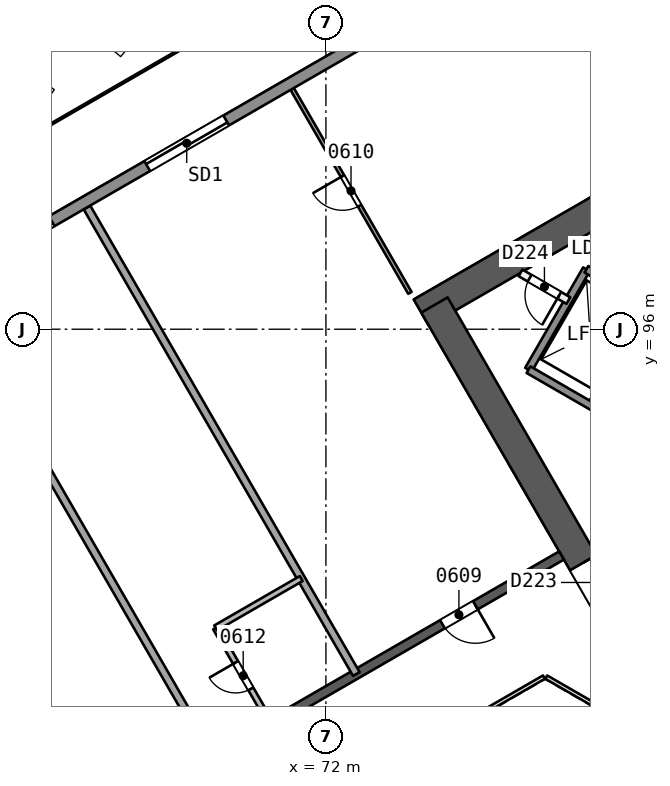
"""IFC4 building model, lengths in metres.
Left out: names, types, materials, properties, quantities, classifications, styles, units other than length and angle.
Written with IfcOpenShell. Run it as: python <this file> out.ifc"""

import sys

from ifc_helpers import new_model, si_unit, direction, frame, frame_2d, origin, place, context, subcontext, project, spatial, rectangle, extrude, element, fill, save


model = new_model("IFC4")
c1 = context("Model", 3, precision=1e-05, world=origin(), true_north=direction((0.0, 1.0)))
c2 = subcontext(c1, "Body", "Model", "MODEL_VIEW")
j1 = project(units=[si_unit("LENGTHUNIT", "METRE"), si_unit("PLANEANGLEUNIT", "RADIAN")], contexts=[c1])
p1 = place(None, origin())
s1 = spatial("IfcSite", under=j1, at=p1, CompositionType="ELEMENT")
p2 = place(p1, origin())
s2 = spatial("IfcBuilding", under=s1, at=p2, CompositionType="ELEMENT")
p3 = place(p2, frame((0.0, 0.0, 33.7)))
s3 = spatial("IfcBuildingStorey", under=s2, at=p3, CompositionType="ELEMENT", Elevation=33.7)
p4 = place(p3, frame((65.538, 80.0, 0.0), z_axis=(0.0, 0.0, 1.0), x_axis=(-0.49999662545, 0.866027352073, 0.0)))
e1 = element("IfcWall", 1, at=p4, inside=s3, PredefinedType="SHEAR", context=c2, shape_type="SweptSolid", body=[
    extrude(rectangle(XDim=10.149, YDim=0.8, at=frame_2d((5.074, 0.0))), origin(), (0.0, 0.0, 1.0), 3.7),
])
p5 = place(p4, frame((0.719, 0.0, 0.0)))
e2 = element("IfcOpeningElement", 2, at=p5, cuts=e1, PredefinedType="OPENING", context=c2, shape_type="SweptSolid", body=[
    extrude(rectangle(XDim=1.2, YDim=2.1, at=frame_2d((0.6, 1.05))), frame((0.0, 0.411, 0.0), z_axis=(0.0, -1.0, 0.0), x_axis=(1.0, 0.0, 0.0)), (0.0, 0.0, 1.0), 0.821),
])
p6 = place(p3, frame((86.723, 103.488, 0.0), z_axis=(0.0, 0.0, 1.0), x_axis=(-0.866032504327, -0.499987701298, 0.0)))
e3 = element("IfcWall", 3, at=p6, inside=s3, PredefinedType="SHEAR", context=c2, shape_type="SweptSolid", body=[
    extrude(rectangle(XDim=14.102, YDim=0.8, at=frame_2d((7.051, 0.0))), origin(), (0.0, 0.0, 1.0), 3.7),
])
p7 = place(p3, frame((74.856, 96.637, 0.0), z_axis=(0.0, 0.0, 1.0), x_axis=(0.499993500917, -0.866029155999, 0.0)))
e4 = element("IfcWall", 4, at=p7, inside=s3, PredefinedType="SHEAR", context=c2, shape_type="SweptSolid", body=[
    extrude(rectangle(XDim=9.98, YDim=0.8, at=frame_2d((4.99, 0.0))), origin(), (0.0, 0.0, 1.0), 3.7),
])
p8 = place(p7, frame((7.83, 0.0, 0.0)))
e5 = element("IfcOpeningElement", 5, at=p8, cuts=e4, PredefinedType="OPENING", context=c2, shape_type="SweptSolid", body=[
    extrude(rectangle(XDim=1.2, YDim=2.1, at=frame_2d((0.6, 1.05))), frame((0.0, 0.411, 0.0), z_axis=(0.0, -1.0, 0.0), x_axis=(1.0, 0.0, 0.0)), (0.0, 0.0, 1.0), 0.821),
])
p9 = place(p3, frame((78.2, 90.046, 0.0), z_axis=(0.0, 0.0, 1.0), x_axis=(-0.866026492143, -0.499998114903, 0.0)))
e6 = element("IfcWall", 6, at=p9, inside=s3, PredefinedType="SHEAR", context=c2, shape_type="SweptSolid", body=[
    extrude(rectangle(XDim=15.588, YDim=0.25, at=frame_2d((7.794, 0.0))), origin(), (0.0, 0.0, 1.0), 3.2),
])
p10 = place(p9, frame((2.618, 0.0, 0.0)))
e7 = element("IfcOpeningElement", 7, at=p10, cuts=e6, PredefinedType="OPENING", context=c2, shape_type="SweptSolid", body=[
    extrude(rectangle(XDim=1.0, YDim=2.1, at=frame_2d((0.5, 1.05))), frame((0.0, 0.135, 0.0), z_axis=(0.0, -1.0, 0.0), x_axis=(1.0, 0.0, 0.0)), (0.0, 0.0, 1.0), 0.271),
])
p11 = place(p9, frame((9.218, 0.0, 0.0)))
e8 = element("IfcOpeningElement", 8, at=p11, cuts=e6, PredefinedType="OPENING", context=c2, shape_type="SweptSolid", body=[
    extrude(rectangle(XDim=1.0, YDim=2.1, at=frame_2d((0.5, 1.05))), frame((0.0, 0.135, 0.0), z_axis=(0.0, -1.0, 0.0), x_axis=(1.0, 0.0, 0.0)), (0.0, 0.0, 1.0), 0.271),
])
p12 = place(p9, frame((12.594, 0.0, 0.0)))
e9 = element("IfcOpeningElement", 9, at=p12, cuts=e6, PredefinedType="OPENING", context=c2, shape_type="SweptSolid", body=[
    extrude(rectangle(XDim=1.0, YDim=2.1, at=frame_2d((0.5, 1.05))), frame((0.0, 0.135, 0.0), z_axis=(0.0, -1.0, 0.0), x_axis=(1.0, 0.0, 0.0)), (0.0, 0.0, 1.0), 0.271),
])
p13 = place(p3, frame((74.21, 96.956, 0.0), z_axis=(0.0, 0.0, 1.0), x_axis=(-0.499986163319, 0.866033392248, 0.0)))
e10 = element("IfcWall", 10, at=p13, inside=s3, PredefinedType="PARTITIONING", context=c2, shape_type="SweptSolid", body=[
    extrude(rectangle(XDim=6.198, YDim=0.1, at=frame_2d((3.099, 0.0))), origin(), (0.0, 0.0, 1.0), 3.2),
])
p14 = place(p13, frame((2.649, 0.0, 0.0)))
e11 = element("IfcOpeningElement", 11, at=p14, cuts=e10, PredefinedType="OPENING", context=c2, shape_type="SweptSolid", body=[
    extrude(rectangle(XDim=0.9, YDim=2.1, at=frame_2d((0.45, 1.05))), frame((0.0, 0.061, 0.0), z_axis=(0.0, -1.0, 0.0), x_axis=(1.0, 0.0, 0.0)), (0.0, 0.0, 1.0), 0.121),
])
p15 = place(p3, frame((65.712, 99.205, 0.0), z_axis=(0.0, 0.0, 1.0), x_axis=(0.499997249004, -0.866026992067, 0.0)))
e12 = element("IfcWall", 12, at=p15, inside=s3, PredefinedType="PARTITIONING", context=c2, shape_type="SweptSolid", body=[
    extrude(rectangle(XDim=14.176, YDim=0.2, at=frame_2d((7.088, 0.0))), origin(), (0.0, 0.0, 1.0), 3.2),
])
p16 = place(p3, frame((70.548, 85.628, 0.0), z_axis=(0.0, 0.0, 1.0), x_axis=(-0.499987231761, 0.866032775405, 0.0)))
e13 = element("IfcWall", 13, at=p16, inside=s3, PredefinedType="PARTITIONING", context=c2, shape_type="SweptSolid", body=[
    extrude(rectangle(XDim=2.9, YDim=0.15, at=frame_2d((1.45, 0.0))), origin(), (0.0, 0.0, 1.0), 3.2),
])
p17 = place(p16, frame((1.05, 0.0, 0.0)))
e14 = element("IfcOpeningElement", 14, at=p17, cuts=e13, PredefinedType="OPENING", context=c2, shape_type="SweptSolid", body=[
    extrude(rectangle(XDim=0.8, YDim=2.1, at=frame_2d((0.4, 1.05))), frame((0.0, 0.085, 0.0), z_axis=(0.0, -1.0, 0.0), x_axis=(1.0, 0.0, 0.0)), (0.0, 0.0, 1.0), 0.171),
])
p18 = place(p3, frame((69.098, 88.14, 0.0), z_axis=(0.0, 0.0, 1.0), x_axis=(0.866021400173, 0.500006934395, 0.0)))
e15 = element("IfcWall", 15, at=p18, inside=s3, PredefinedType="PARTITIONING", context=c2, shape_type="SweptSolid", body=[
    extrude(rectangle(XDim=2.6, YDim=0.15, at=frame_2d((1.3, 0.0))), origin(), (0.0, 0.0, 1.0), 3.2),
])
p19 = place(p3, frame((61.932, 97.023, 0.0), z_axis=(0.0, 0.0, 1.0), x_axis=(0.499997249004, -0.866026992067, 0.0)))
e16 = element("IfcWall", 16, at=p19, inside=s3, PredefinedType="PARTITIONING", context=c2, shape_type="SweptSolid", body=[
    extrude(rectangle(XDim=14.176, YDim=0.2, at=frame_2d((7.088, 0.0))), origin(), (0.0, 0.0, 1.0), 3.2),
])
p20 = place(p3, frame((37.61, 83.152, 0.0), z_axis=(0.0, 0.0, 1.0), x_axis=(0.866024438126, 0.500001672566, 0.0)))
e17 = element("IfcWall", 17, at=p20, inside=s3, PredefinedType="SOLIDWALL", context=c2, shape_type="SweptSolid", body=[
    extrude(rectangle(XDim=61.61, YDim=0.3, at=frame_2d((30.805, 0.0))), origin(), (0.0, 0.0, 1.0), 3.2),
])
p21 = place(p20, frame((34.281, 0.0, 0.0)))
e18 = element("IfcOpeningElement", 18, at=p21, cuts=e17, PredefinedType="OPENING", context=c2, shape_type="SweptSolid", body=[
    extrude(rectangle(XDim=2.4, YDim=2.4, at=frame_2d((1.2, 1.2))), frame((0.0, 0.161, 0.0), z_axis=(0.0, -1.0, 0.0), x_axis=(1.0, 0.0, 0.0)), (0.0, 0.0, 1.0), 0.321),
])
p22 = place(p20, frame((47.767, 0.0, 0.0)))
e19 = element("IfcOpeningElement", 19, at=p22, cuts=e17, PredefinedType="OPENING", context=c2, shape_type="SweptSolid", body=[
    extrude(rectangle(XDim=2.4, YDim=2.4, at=frame_2d((1.2, 1.2))), frame((0.0, 0.161, 0.0), z_axis=(0.0, -1.0, 0.0), x_axis=(1.0, 0.0, 0.0)), (0.0, 0.0, 1.0), 0.321),
])
p23 = place(p20, frame((24.305, 0.0, 0.0)))
e20 = element("IfcOpeningElement", 20, at=p23, cuts=e17, PredefinedType="OPENING", context=c2, shape_type="SweptSolid", body=[
    extrude(rectangle(XDim=2.4, YDim=2.4, at=frame_2d((1.2, 1.2))), frame((0.0, 0.161, 0.0), z_axis=(0.0, -1.0, 0.0), x_axis=(1.0, 0.0, 0.0)), (0.0, 0.0, 1.0), 0.321),
])
p24 = place(p20, frame((11.402, 0.0, 0.0)))
e21 = element("IfcOpeningElement", 21, at=p24, cuts=e17, PredefinedType="OPENING", context=c2, shape_type="SweptSolid", body=[
    extrude(rectangle(XDim=2.4, YDim=2.4, at=frame_2d((1.2, 1.2))), frame((0.0, 0.161, 0.0), z_axis=(0.0, -1.0, 0.0), x_axis=(1.0, 0.0, 0.0)), (0.0, 0.0, 1.0), 0.321),
])
p25 = place(p20, frame((28.981, 0.0, 0.0)))
e22 = element("IfcOpeningElement", 22, at=p25, cuts=e17, PredefinedType="OPENING", context=c2, shape_type="SweptSolid", body=[
    extrude(rectangle(XDim=2.4, YDim=2.4, at=frame_2d((1.2, 1.2))), frame((0.0, 0.161, 0.0), z_axis=(0.0, -1.0, 0.0), x_axis=(1.0, 0.0, 0.0)), (0.0, 0.0, 1.0), 0.321),
])
for number, where, z_axis, x_axis in (
    (23, (78.976, 93.986, 0.0), (0.0, 0.0, 1.0), (0.5, 0.866, 0.0)),
    (24, (77.33, 94.936, 0.0), (0.0, 0.0, 1.0), (0.5, 0.866, 0.0)),
):
    element("IfcWall", number, at=place(p3, frame(where, z_axis=z_axis, x_axis=x_axis)), inside=s3, PredefinedType="SOLIDWALL", context=c2, shape_type="SweptSolid", body=[
        extrude(rectangle(XDim=3.05, YDim=0.2, at=frame_2d((1.525, 0.0))), origin(), (0.0, 0.0, 1.0), 3.2),
    ])
p26 = place(p3, frame((86.77, 89.486, 0.0), z_axis=(0.0, 0.0, 1.0), x_axis=(-0.86601811187, 0.500012629753, 0.0)))
e25 = element("IfcWall", 25, at=p26, inside=s3, PredefinedType="SOLIDWALL", context=c2, shape_type="SweptSolid", body=[
    extrude(rectangle(XDim=10.9, YDim=0.2, at=frame_2d((5.45, 0.0))), origin(), (0.0, 0.0, 1.0), 3.2),
])
p27 = place(p3, frame((78.38, 96.755, 0.0), z_axis=(0.0, 0.0, 1.0), x_axis=(-0.866003949776, 0.500037157592, 0.0)))
e26 = element("IfcWall", 26, at=p27, inside=s3, PredefinedType="PARTITIONING", context=c2, shape_type="SweptSolid", body=[
    extrude(rectangle(XDim=1.455, YDim=0.2, at=frame_2d((0.728, 0.0))), origin(), (0.0, 0.0, 1.0), 3.2),
])
p28 = place(p27, frame((0.278, 0.0, 0.0)))
e27 = element("IfcOpeningElement", 27, at=p28, cuts=e26, PredefinedType="OPENING", context=c2, shape_type="SweptSolid", body=[
    extrude(rectangle(XDim=0.9, YDim=2.1, at=frame_2d((0.45, 1.05))), frame((0.0, 0.11, 0.0), z_axis=(0.0, -1.0, 0.0), x_axis=(1.0, 0.0, 0.0)), (0.0, 0.0, 1.0), 0.221),
])
p29 = place(p3, frame((80.5, 96.627, 0.0), z_axis=(0.0, 0.0, 1.0), x_axis=(-0.86601224135, 0.500022797313, 0.0)))
e28 = element("IfcWall", 28, at=p29, inside=s3, PredefinedType="SOLIDWALL", context=c2, shape_type="SweptSolid", body=[
    extrude(rectangle(XDim=1.9, YDim=0.2, at=frame_2d((0.95, 0.0))), origin(), (0.0, 0.0, 1.0), 3.2),
])
p30 = place(p29, frame((0.4, 0.0, 0.0)))
e29 = element("IfcOpeningElement", 29, at=p30, cuts=e28, PredefinedType="OPENING", context=c2, shape_type="SweptSolid", body=[
    extrude(rectangle(XDim=1.1, YDim=2.1, at=frame_2d((0.55, 1.05))), frame((0.0, 0.11, 0.0), z_axis=(0.0, -1.0, 0.0), x_axis=(1.0, 0.0, 0.0)), (0.0, 0.0, 1.0), 0.221),
])
p31 = place(p3, frame((79.53, 85.846, 0.0), z_axis=(0.0, 0.0, 1.0), x_axis=(-0.866041268327, 0.499972520799, 0.0)))
e30 = element("IfcWall", 30, at=p31, inside=s3, PredefinedType="PARTITIONING", context=c2, shape_type="SweptSolid", body=[
    extrude(rectangle(XDim=2.0, YDim=0.1, at=frame_2d((1.0, 0.0))), origin(), (0.0, 0.0, 1.0), 3.2),
])
p32 = place(p3, frame((77.738, 86.846, 0.0), z_axis=(0.0, 0.0, 1.0), x_axis=(-0.866026658274, -0.499997827154, 0.0)))
e31 = element("IfcWall", 31, at=p32, inside=s3, PredefinedType="PARTITIONING", context=c2, shape_type="SweptSolid", body=[
    extrude(rectangle(XDim=11.588, YDim=0.1, at=frame_2d((5.794, 0.0))), origin(), (0.0, 0.0, 1.0), 3.2),
])
p33 = place(p10, origin())
e32 = element("IfcDoor", 32, at=p33, inside=s3, OperationType="SINGLE_SWING_LEFT", PredefinedType="NOTDEFINED", context=c2, shape_type="SweptSolid", body=[
    extrude(rectangle(XDim=1.0, YDim=2.1, at=frame_2d((0.5, 1.05))), frame((0.0, 0.025, 0.0), z_axis=(0.0, -1.0, 0.0), x_axis=(1.0, 0.0, 0.0)), (0.0, 0.0, 1.0), 0.05),
])
fill(e7, e32)
p34 = place(p14, origin())
e33 = element("IfcDoor", 33, at=p34, inside=s3, OperationType="SINGLE_SWING_RIGHT", PredefinedType="NOTDEFINED", context=c2, shape_type="SweptSolid", body=[
    extrude(rectangle(XDim=0.9, YDim=2.1, at=frame_2d((0.45, 1.05))), frame((0.0, 0.025, 0.0), z_axis=(0.0, -1.0, 0.0), x_axis=(1.0, 0.0, 0.0)), (0.0, 0.0, 1.0), 0.05),
])
fill(e11, e33)
p35 = place(p17, origin())
e34 = element("IfcDoor", 34, at=p35, inside=s3, OperationType="SINGLE_SWING_RIGHT", PredefinedType="NOTDEFINED", context=c2, shape_type="SweptSolid", body=[
    extrude(rectangle(XDim=0.8, YDim=2.1, at=frame_2d((0.4, 1.05))), frame((0.0, 0.025, 0.0), z_axis=(0.0, -1.0, 0.0), x_axis=(1.0, 0.0, 0.0)), (0.0, 0.0, 1.0), 0.05),
])
fill(e14, e34)
p36 = place(p21, origin())
e35 = element("IfcDoor", 35, at=p36, inside=s3, OperationType="SLIDING_TO_LEFT", PredefinedType="NOTDEFINED", context=c2, shape_type="SweptSolid", body=[
    extrude(rectangle(XDim=2.4, YDim=2.4, at=frame_2d((1.2, 1.2))), frame((0.0, 0.025, 0.0), z_axis=(0.0, -1.0, 0.0), x_axis=(1.0, 0.0, 0.0)), (0.0, 0.0, 1.0), 0.05),
])
fill(e18, e35)
p37 = place(p8, origin())
e36 = element("IfcDoor", 36, at=p37, inside=s3, OperationType="SINGLE_SWING_LEFT", PredefinedType="NOTDEFINED", context=c2, shape_type="SweptSolid", body=[
    extrude(rectangle(XDim=1.2, YDim=2.1, at=frame_2d((0.6, 1.05))), frame((0.0, 0.025, 0.0), z_axis=(0.0, -1.0, 0.0), x_axis=(1.0, 0.0, 0.0)), (0.0, 0.0, 1.0), 0.05),
])
fill(e5, e36)
p38 = place(p28, origin())
e37 = element("IfcDoor", 37, at=p38, inside=s3, OperationType="SINGLE_SWING_LEFT", PredefinedType="NOTDEFINED", context=c2, shape_type="SweptSolid", body=[
    extrude(rectangle(XDim=0.9, YDim=2.1, at=frame_2d((0.45, 1.05))), frame((0.0, 0.025, 0.0), z_axis=(0.0, -1.0, 0.0), x_axis=(1.0, 0.0, 0.0)), (0.0, 0.0, 1.0), 0.05),
])
fill(e27, e37)
save(model, sys.argv[1])
